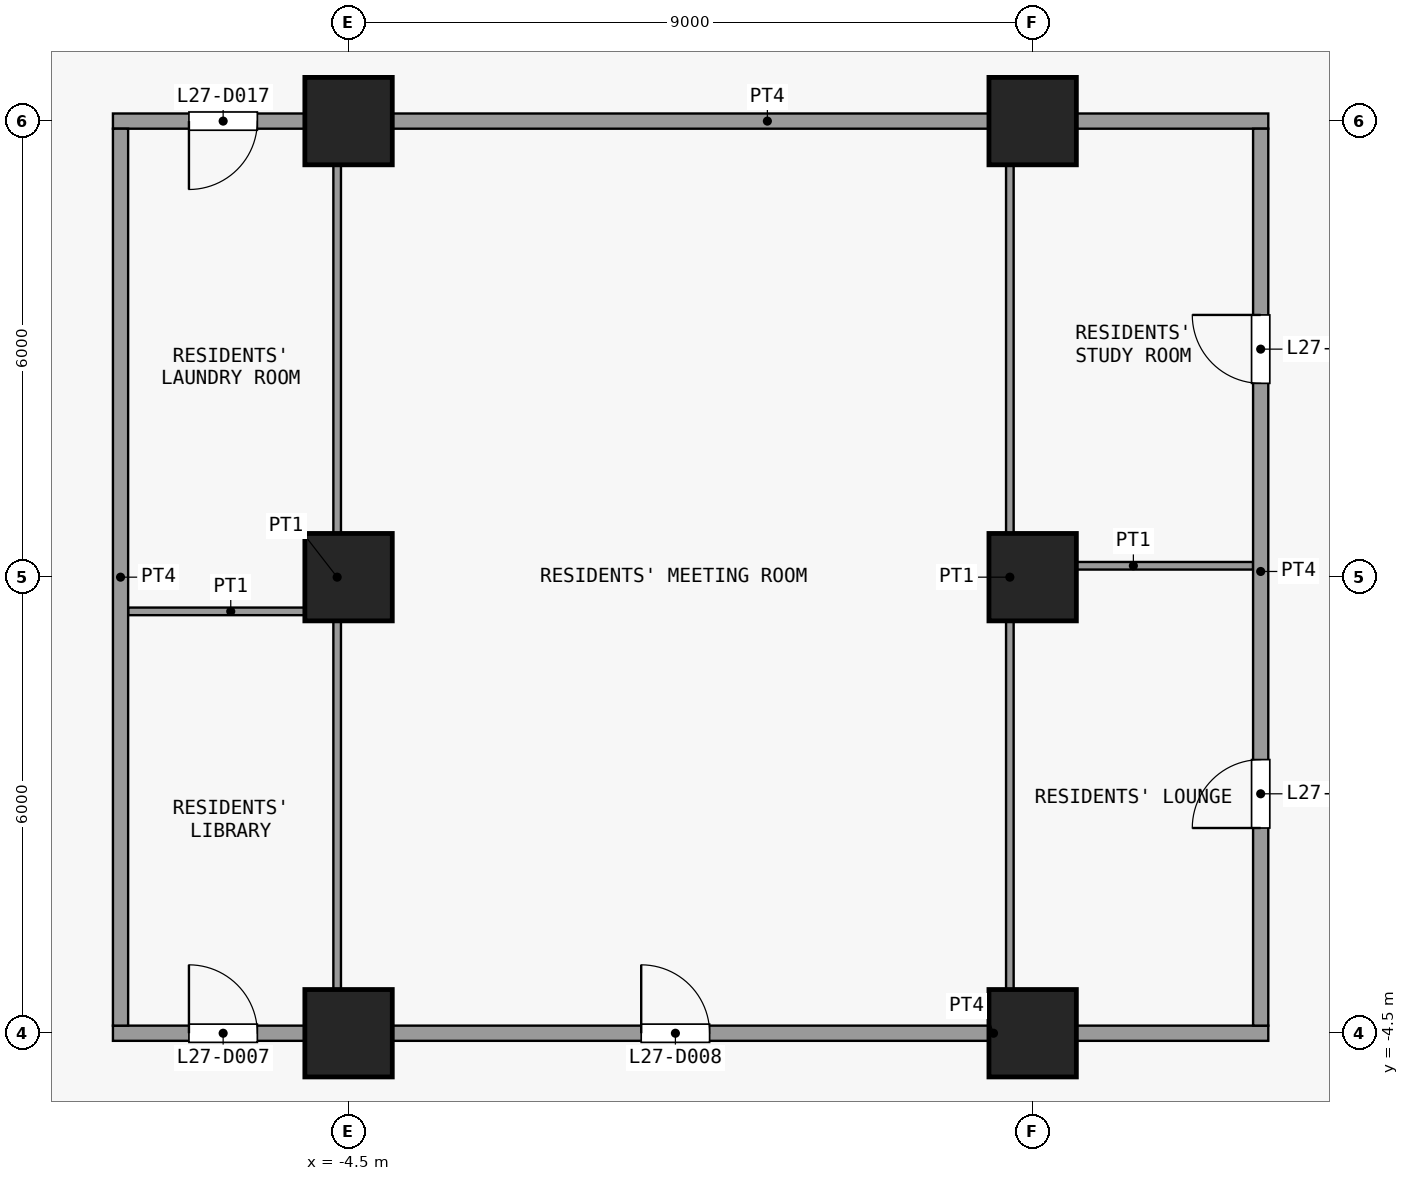
"""IFC4 building model, lengths in metres.
Left out: names, types, materials, properties, quantities, classifications, styles, units other than length and angle.
Written with IfcOpenShell. Run it as: python <this file> out.ifc"""

import sys

from ifc_helpers import new_model, si_unit, direction, frame, frame_2d, origin, origin_2d, place, context, subcontext, project, spatial, rectangle, extrude, element, fill, save


model = new_model("IFC4")
c1 = context("Model", 3, precision=1e-05, world=origin(), true_north=direction((0.0, 1.0)))
c2 = subcontext(c1, "Body", "Model", "MODEL_VIEW")
j1 = project(units=[si_unit("LENGTHUNIT", "METRE"), si_unit("PLANEANGLEUNIT", "RADIAN")], contexts=[c1])
p1 = place(None, origin())
s1 = spatial("IfcSite", under=j1, at=p1, CompositionType="ELEMENT")
p2 = place(p1, origin())
s2 = spatial("IfcBuilding", under=s1, at=p2, CompositionType="ELEMENT")
p3 = place(p2, frame((0.0, 0.0, 109.9)))
s3 = spatial("IfcBuildingStorey", under=s2, at=p3, CompositionType="ELEMENT", Elevation=109.9)
for number, where, z_axis, x_axis in (
    (1, (-4.5, -4.5, 0.0), (0.0, 0.0, 1.0), (1.0, 0.0, 0.0)),
    (2, (-4.5, 1.5, 0.0), (0.0, 0.0, 1.0), (1.0, 0.0, 0.0)),
    (3, (-4.5, 7.5, 0.0), (0.0, 0.0, 1.0), (1.0, 0.0, 0.0)),
    (4, (4.5, -4.5, 0.0), (0.0, 0.0, 1.0), (1.0, 0.0, 0.0)),
    (5, (4.5, 1.5, 0.0), (0.0, 0.0, 1.0), (1.0, 0.0, 0.0)),
    (6, (4.5, 7.5, 0.0), (0.0, 0.0, 1.0), (1.0, 0.0, 0.0)),
):
    element("IfcColumn", number, at=place(p3, frame(where, z_axis=z_axis, x_axis=x_axis)), inside=s3, PredefinedType="COLUMN", context=c2, shape_type="SweptSolid", body=[
        extrude(rectangle(XDim=1.15, YDim=1.15, at=origin_2d()), origin(), (0.0, 0.0, 1.0), 3.6),
    ])
p4 = place(p3, frame((-7.6, -4.5, 0.0), z_axis=(0.0, 0.0, 1.0), x_axis=(1.0, 0.0, 0.0)))
e7 = element("IfcWall", 7, at=p4, inside=s3, PredefinedType="PARTITIONING", context=c2, shape_type="SweptSolid", body=[
    extrude(rectangle(XDim=15.2, YDim=0.2, at=frame_2d((7.6, 0.0))), origin(), (0.0, 0.0, 1.0), 3.3),
])
p5 = place(p4, frame((1.0, 0.0, 0.0)))
e8 = element("IfcOpeningElement", 8, at=p5, cuts=e7, PredefinedType="OPENING", context=c2, shape_type="SweptSolid", body=[
    extrude(rectangle(XDim=0.9, YDim=2.1, at=frame_2d((0.45, 1.05))), frame((0.0, 0.11, 0.0), z_axis=(0.0, -1.0, 0.0), x_axis=(1.0, 0.0, 0.0)), (0.0, 0.0, 1.0), 0.22),
])
p6 = place(p4, frame((6.95, 0.0, 0.0)))
e9 = element("IfcOpeningElement", 9, at=p6, cuts=e7, PredefinedType="OPENING", context=c2, shape_type="SweptSolid", body=[
    extrude(rectangle(XDim=0.9, YDim=2.1, at=frame_2d((0.45, 1.05))), frame((0.0, 0.11, 0.0), z_axis=(0.0, -1.0, 0.0), x_axis=(1.0, 0.0, 0.0)), (0.0, 0.0, 1.0), 0.22),
])
p7 = place(p3, frame((-7.4, 1.05, 0.0), z_axis=(0.0, 0.0, 1.0), x_axis=(1.0, 0.0, 0.0)))
e10 = element("IfcWall", 10, at=p7, inside=s3, PredefinedType="PARTITIONING", context=c2, shape_type="SweptSolid", body=[
    extrude(rectangle(XDim=2.7, YDim=0.1, at=frame_2d((1.35, 0.0))), origin(), (0.0, 0.0, 1.0), 3.3),
])
p8 = place(p3, frame((4.25, 1.65, 0.0), z_axis=(0.0, 0.0, 1.0), x_axis=(1.0, 0.0, 0.0)))
e11 = element("IfcWall", 11, at=p8, inside=s3, PredefinedType="PARTITIONING", context=c2, shape_type="SweptSolid", body=[
    extrude(rectangle(XDim=3.15, YDim=0.1, at=frame_2d((1.575, 0.0))), origin(), (0.0, 0.0, 1.0), 3.3),
])
p9 = place(p3, frame((-7.6, 7.5, 0.0), z_axis=(0.0, 0.0, 1.0), x_axis=(1.0, 0.0, 0.0)))
e12 = element("IfcWall", 12, at=p9, inside=s3, PredefinedType="PARTITIONING", context=c2, shape_type="SweptSolid", body=[
    extrude(rectangle(XDim=15.2, YDim=0.2, at=frame_2d((7.6, 0.0))), origin(), (0.0, 0.0, 1.0), 3.3),
])
p10 = place(p9, frame((1.0, 0.0, 0.0)))
e13 = element("IfcOpeningElement", 13, at=p10, cuts=e12, PredefinedType="OPENING", context=c2, shape_type="SweptSolid", body=[
    extrude(rectangle(XDim=0.9, YDim=2.1, at=frame_2d((0.45, 1.05))), frame((0.0, 0.11, 0.0), z_axis=(0.0, -1.0, 0.0), x_axis=(1.0, 0.0, 0.0)), (0.0, 0.0, 1.0), 0.22),
])
p11 = place(p3, frame((-7.5, -4.4, 0.0), z_axis=(0.0, 0.0, 1.0), x_axis=(0.0, 1.0, 0.0)))
e14 = element("IfcWall", 14, at=p11, inside=s3, PredefinedType="PARTITIONING", context=c2, shape_type="SweptSolid", body=[
    extrude(rectangle(XDim=11.8, YDim=0.2, at=frame_2d((5.9, 0.0))), origin(), (0.0, 0.0, 1.0), 3.3),
])
for number, where, z_axis, x_axis in (
    (15, (-4.65, -4.4, 0.0), (0.0, 0.0, 1.0), (0.0, 1.0, 0.0)),
    (16, (4.2, -4.4, 0.0), (0.0, 0.0, 1.0), (0.0, 1.0, 0.0)),
):
    element("IfcWall", number, at=place(p3, frame(where, z_axis=z_axis, x_axis=x_axis)), inside=s3, PredefinedType="PARTITIONING", context=c2, shape_type="SweptSolid", body=[
        extrude(rectangle(XDim=11.8, YDim=0.1, at=frame_2d((5.9, 0.0))), origin(), (0.0, 0.0, 1.0), 3.3),
    ])
p12 = place(p3, frame((7.5, -4.4, 0.0), z_axis=(0.0, 0.0, 1.0), x_axis=(0.0, 1.0, 0.0)))
e17 = element("IfcWall", 17, at=p12, inside=s3, PredefinedType="PARTITIONING", context=c2, shape_type="SweptSolid", body=[
    extrude(rectangle(XDim=11.8, YDim=0.2, at=frame_2d((5.9, 0.0))), origin(), (0.0, 0.0, 1.0), 3.3),
])
p13 = place(p12, frame((2.6, 0.0, 0.0)))
e18 = element("IfcOpeningElement", 18, at=p13, cuts=e17, PredefinedType="OPENING", context=c2, shape_type="SweptSolid", body=[
    extrude(rectangle(XDim=0.9, YDim=2.1, at=frame_2d((0.45, 1.05))), frame((0.0, 0.11, 0.0), z_axis=(0.0, -1.0, 0.0), x_axis=(1.0, 0.0, 0.0)), (0.0, 0.0, 1.0), 0.22),
])
p14 = place(p12, frame((8.45, 0.0, 0.0)))
e19 = element("IfcOpeningElement", 19, at=p14, cuts=e17, PredefinedType="OPENING", context=c2, shape_type="SweptSolid", body=[
    extrude(rectangle(XDim=0.9, YDim=2.1, at=frame_2d((0.45, 1.05))), frame((0.0, 0.11, 0.0), z_axis=(0.0, -1.0, 0.0), x_axis=(1.0, 0.0, 0.0)), (0.0, 0.0, 1.0), 0.22),
])
p15 = place(p5, origin())
e20 = element("IfcDoor", 20, at=p15, inside=s3, OperationType="SINGLE_SWING_RIGHT", PredefinedType="DOOR", context=c2, shape_type="SweptSolid", body=[
    extrude(rectangle(XDim=0.9, YDim=2.1, at=frame_2d((0.45, 1.05))), frame((0.0, 0.025, 0.0), z_axis=(0.0, -1.0, 0.0), x_axis=(1.0, 0.0, 0.0)), (0.0, 0.0, 1.0), 0.05),
])
fill(e8, e20)
p16 = place(p6, origin())
e21 = element("IfcDoor", 21, at=p16, inside=s3, OperationType="SINGLE_SWING_RIGHT", PredefinedType="DOOR", context=c2, shape_type="SweptSolid", body=[
    extrude(rectangle(XDim=0.9, YDim=2.1, at=frame_2d((0.45, 1.05))), frame((0.0, 0.025, 0.0), z_axis=(0.0, -1.0, 0.0), x_axis=(1.0, 0.0, 0.0)), (0.0, 0.0, 1.0), 0.05),
])
fill(e9, e21)
p17 = place(p10, origin())
e22 = element("IfcDoor", 22, at=p17, inside=s3, OperationType="SINGLE_SWING_LEFT", PredefinedType="DOOR", context=c2, shape_type="SweptSolid", body=[
    extrude(rectangle(XDim=0.9, YDim=2.1, at=frame_2d((0.45, 1.05))), frame((0.0, 0.025, 0.0), z_axis=(0.0, -1.0, 0.0), x_axis=(1.0, 0.0, 0.0)), (0.0, 0.0, 1.0), 0.05),
])
fill(e13, e22)
p18 = place(p13, origin())
e23 = element("IfcDoor", 23, at=p18, inside=s3, OperationType="SINGLE_SWING_RIGHT", PredefinedType="DOOR", context=c2, shape_type="SweptSolid", body=[
    extrude(rectangle(XDim=0.9, YDim=2.1, at=frame_2d((0.45, 1.05))), frame((0.0, 0.025, 0.0), z_axis=(0.0, -1.0, 0.0), x_axis=(1.0, 0.0, 0.0)), (0.0, 0.0, 1.0), 0.05),
])
fill(e18, e23)
p19 = place(p14, origin())
e24 = element("IfcDoor", 24, at=p19, inside=s3, OperationType="SINGLE_SWING_LEFT", PredefinedType="DOOR", context=c2, shape_type="SweptSolid", body=[
    extrude(rectangle(XDim=0.9, YDim=2.1, at=frame_2d((0.45, 1.05))), frame((0.0, 0.025, 0.0), z_axis=(0.0, -1.0, 0.0), x_axis=(1.0, 0.0, 0.0)), (0.0, 0.0, 1.0), 0.05),
])
fill(e19, e24)
save(model, sys.argv[1])
